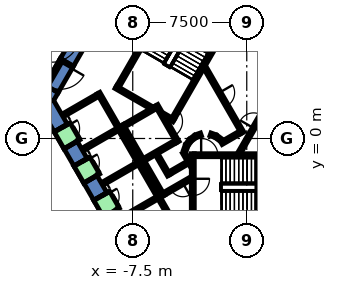
"""IFC4 building model, lengths in metres.
Left out: names, types, materials, properties, quantities, classifications, styles, units other than length and angle.
Written with IfcOpenShell. Run it as: python <this file> out.ifc"""

import sys

from ifc_helpers import new_model, si_unit, direction, frame, frame_2d, origin, place, context, subcontext, project, spatial, polyline, rectangle, outline, extrude, element, fill, save


model = new_model("IFC4")
c1 = context("Model", 3, precision=1e-05, world=origin(), true_north=direction((0.0, 1.0)))
c2 = subcontext(c1, "Body", "Model", "MODEL_VIEW")
j1 = project(units=[si_unit("LENGTHUNIT", "METRE"), si_unit("PLANEANGLEUNIT", "RADIAN")], contexts=[c1])
p1 = place(None, origin())
s1 = spatial("IfcSite", under=j1, at=p1, CompositionType="ELEMENT")
p2 = place(p1, origin())
s2 = spatial("IfcBuilding", under=s1, at=p2, CompositionType="ELEMENT")
p3 = place(p2, origin())
s3 = spatial("IfcBuildingStorey", under=s2, at=p3, CompositionType="ELEMENT", Elevation=0.0)
p4 = place(p3, frame((0.0, 0.0, -0.5)))
e1 = element("IfcWall", 1, at=p4, inside=s3, PredefinedType="SHEAR", context=c2, shape_type="SweptSolid", body=[
    extrude(outline(polyline([(-12.267, 5.252), (-11.402, 4.752), (-6.351, 13.5), (-6.928, 14.5), (-12.267, 5.252)])), origin(), (0.0, 0.0, 1.0), 9.05),
])
p5 = place(p3, frame((0.0, 0.0, -0.5)))
e2 = element("IfcWall", 2, at=p5, inside=s3, PredefinedType="SHEAR", context=c2, shape_type="SweptSolid", body=[
    extrude(outline(polyline([(-12.402, 3.02), (-13.267, 3.52), (-13.856, 2.5), (-12.702, 2.5), (-12.402, 3.02)])), origin(), (0.0, 0.0, 1.0), 9.05),
])
p6 = place(p3, frame((0.0, 0.0, 3.6)))
e3 = element("IfcWall", 3, at=p6, inside=s3, PredefinedType="SHEAR", context=c2, shape_type="SweptSolid", body=[
    extrude(outline(polyline([(-13.267, 3.52), (-12.402, 3.02), (-11.402, 4.752), (-12.267, 5.252), (-13.267, 3.52)])), origin(), (0.0, 0.0, 1.0), 4.95),
])
p7 = place(p3, frame((0.0, 0.0, -0.5)))
e4 = element("IfcWall", 4, at=p7, inside=s3, PredefinedType="SHEAR", context=c2, shape_type="SweptSolid", body=[
    extrude(outline(polyline([(-12.667, 0.44), (-11.801, 0.94), (-12.702, 2.5), (-13.856, 2.5), (-12.667, 0.44)])), origin(), (0.0, 0.0, 1.0), 9.05),
])
p8 = place(p3, frame((0.0, 0.0, -0.5)))
e5 = element("IfcWall", 5, at=p8, inside=s3, PredefinedType="SHEAR", context=c2, shape_type="SweptSolid", body=[
    extrude(outline(polyline([(-11.367, -1.811), (-10.501, -1.311), (-11.151, -0.186), (-12.017, -0.686), (-11.367, -1.811)])), origin(), (0.0, 0.0, 1.0), 9.05),
])
p9 = place(p3, frame((0.0, 0.0, -0.5)))
e6 = element("IfcWall", 6, at=p9, inside=s3, PredefinedType="SHEAR", context=c2, shape_type="SweptSolid", body=[
    extrude(outline(polyline([(-10.067, -4.063), (-9.201, -3.563), (-9.851, -2.437), (-10.717, -2.937), (-10.067, -4.063)])), origin(), (0.0, 0.0, 1.0), 9.05),
])
p10 = place(p3, frame((0.0, 0.0, -0.5)))
e7 = element("IfcWall", 7, at=p10, inside=s3, PredefinedType="SHEAR", context=c2, shape_type="SweptSolid", body=[
    extrude(outline(polyline([(-8.767, -6.314), (-7.902, -5.814), (-8.551, -4.689), (-9.417, -5.189), (-8.767, -6.314)])), origin(), (0.0, 0.0, 1.0), 9.05),
])
p11 = place(p3, frame((0.0, 0.0, 3.6)))
e8 = element("IfcWall", 8, at=p11, inside=s3, PredefinedType="SHEAR", context=c2, shape_type="SweptSolid", body=[
    extrude(outline(polyline([(-12.017, -0.686), (-11.151, -0.186), (-11.801, 0.94), (-12.667, 0.44), (-12.017, -0.686)])), origin(), (0.0, 0.0, 1.0), 4.95),
])
p12 = place(p3, frame((0.0, 0.0, 3.6)))
e9 = element("IfcWall", 9, at=p12, inside=s3, PredefinedType="SHEAR", context=c2, shape_type="SweptSolid", body=[
    extrude(outline(polyline([(-10.717, -2.937), (-9.851, -2.437), (-10.501, -1.311), (-11.367, -1.811), (-10.717, -2.937)])), origin(), (0.0, 0.0, 1.0), 4.95),
])
p13 = place(p3, frame((0.0, 0.0, 3.6)))
e10 = element("IfcWall", 10, at=p13, inside=s3, PredefinedType="SHEAR", context=c2, shape_type="SweptSolid", body=[
    extrude(outline(polyline([(-9.417, -5.189), (-8.551, -4.689), (-9.201, -3.563), (-10.067, -4.063), (-9.417, -5.189)])), origin(), (0.0, 0.0, 1.0), 4.95),
])
p14 = place(p3, frame((-3.9, -1.599, 0.0), z_axis=(0.0, 0.0, 1.0), x_axis=(-0.865969445389, -0.500096910261, 0.0)))
e11 = element("IfcWall", 11, at=p14, inside=s3, PredefinedType="PARTITIONING", context=c2, shape_type="SweptSolid", body=[
    extrude(rectangle(XDim=1.373, YDim=0.2, at=frame_2d((0.687, 0.0))), origin(), (0.0, 0.0, 1.0), 8.55),
])
p15 = place(p3, frame((-5.126, -2.422, 0.0), z_axis=(0.0, 0.0, 1.0), x_axis=(-0.500062241894, 0.865989465428, 0.0)))
e12 = element("IfcWall", 12, at=p15, inside=s3, PredefinedType="PARTITIONING", context=c2, shape_type="SweptSolid", body=[
    extrude(rectangle(XDim=1.7, YDim=0.2, at=frame_2d((0.85, 0.0))), origin(), (0.0, 0.0, 1.0), 8.55),
])
p16 = place(p3, frame((-5.492, -3.788, 0.0), z_axis=(0.0, 0.0, 1.0), x_axis=(-0.500008949224, 0.866020236886, 0.0)))
e13 = element("IfcWall", 13, at=p16, inside=s3, PredefinedType="PARTITIONING", context=c2, shape_type="SweptSolid", body=[
    extrude(rectangle(XDim=2.68, YDim=0.2, at=frame_2d((1.34, 0.0))), origin(), (0.0, 0.0, 1.0), 8.55),
])
p17 = place(p3, frame((-4.145, -0.92, 0.0), z_axis=(0.0, 0.0, 1.0), x_axis=(0.499743786207, -0.866173278362, 0.0)))
e14 = element("IfcWall", 14, at=p17, inside=s3, PredefinedType="PARTITIONING", context=c2, shape_type="SweptSolid", body=[
    extrude(rectangle(XDim=0.991, YDim=0.2, at=frame_2d((0.495, 0.0))), origin(), (0.0, 0.0, 1.0), 8.55),
])
p18 = place(p3, frame((-3.65, -2.61, 0.0), z_axis=(0.0, 0.0, 1.0), x_axis=(-0.866072462134, -0.499918483688, 0.0)))
e15 = element("IfcWall", 15, at=p18, inside=s3, PredefinedType="PARTITIONING", context=c2, shape_type="SweptSolid", body=[
    extrude(rectangle(XDim=2.084, YDim=0.2, at=frame_2d((1.042, 0.0))), origin(), (0.0, 0.0, 1.0), 8.55),
])
p19 = place(p18, frame((0.642, 0.0, 0.0)))
e16 = element("IfcOpeningElement", 16, at=p19, cuts=e15, PredefinedType="OPENING", context=c2, shape_type="SweptSolid", body=[
    extrude(rectangle(XDim=0.9, YDim=2.1, at=frame_2d((0.45, 1.05))), frame((0.0, 0.11, 0.0), z_axis=(0.0, -1.0, 0.0), x_axis=(1.0, 0.0, 0.0)), (0.0, 0.0, 1.0), 0.22),
])
p20 = place(p3, frame((-0.52, -1.0, 0.0), z_axis=(0.0, 0.0, 1.0), x_axis=(0.50011622646, 0.865958290007, 0.0)))
e17 = element("IfcWall", 17, at=p20, inside=s3, PredefinedType="PARTITIONING", context=c2, shape_type="SweptSolid", body=[
    extrude(rectangle(XDim=4.991, YDim=0.2, at=frame_2d((2.496, 0.0))), origin(), (0.0, 0.0, 1.0), 8.55),
])
p21 = place(p20, frame((1.945, 0.0, 0.0)))
e18 = element("IfcOpeningElement", 18, at=p21, cuts=e17, PredefinedType="OPENING", context=c2, shape_type="SweptSolid", body=[
    extrude(rectangle(XDim=1.0, YDim=2.1, at=frame_2d((0.5, 1.05))), frame((0.0, 0.11, 0.0), z_axis=(0.0, -1.0, 0.0), x_axis=(1.0, 0.0, 0.0)), (0.0, 0.0, 1.0), 0.22),
])
p22 = place(p3, frame((-0.412, 0.414, 0.0), z_axis=(0.0, 0.0, 1.0), x_axis=(-0.866017369001, -0.500013916395, 0.0)))
e19 = element("IfcWall", 19, at=p22, inside=s3, PredefinedType="PARTITIONING", context=c2, shape_type="SweptSolid", body=[
    extrude(rectangle(XDim=1.45, YDim=0.2, at=frame_2d((0.725, 0.0))), origin(), (0.0, 0.0, 1.0), 8.55),
])
p23 = place(p3, frame((-1.731, -0.077, 0.0), z_axis=(0.0, 0.0, 1.0), x_axis=(-0.804311165252, 0.594208338422, 0.0)))
e20 = element("IfcWall", 20, at=p23, inside=s3, PredefinedType="PARTITIONING", context=c2, shape_type="SweptSolid", body=[
    extrude(rectangle(XDim=0.338, YDim=0.2, at=frame_2d((0.169, 0.0))), origin(), (0.0, 0.0, 1.0), 8.55),
])
p24 = place(p3, frame((-2.07, 0.16, 0.0), z_axis=(0.0, 0.0, 1.0), x_axis=(-0.942199461132, 0.335052496547, 0.0)))
e21 = element("IfcWall", 21, at=p24, inside=s3, PredefinedType="PARTITIONING", context=c2, shape_type="SweptSolid", body=[
    extrude(rectangle(XDim=0.337, YDim=0.2, at=frame_2d((0.169, 0.0))), origin(), (0.0, 0.0, 1.0), 8.55),
])
p25 = place(p3, frame((-3.012, 0.273, 0.0), z_axis=(0.0, 0.0, 1.0), x_axis=(-0.942280615813, -0.334824194261, 0.0)))
e22 = element("IfcWall", 22, at=p25, inside=s3, PredefinedType="PARTITIONING", context=c2, shape_type="SweptSolid", body=[
    extrude(rectangle(XDim=0.338, YDim=0.2, at=frame_2d((0.169, 0.0))), origin(), (0.0, 0.0, 1.0), 8.55),
])
p26 = place(p3, frame((-3.397, 0.124, 0.0), z_axis=(0.0, 0.0, 1.0), x_axis=(-0.804311165252, -0.594208338422, 0.0)))
e23 = element("IfcWall", 23, at=p26, inside=s3, PredefinedType="PARTITIONING", context=c2, shape_type="SweptSolid", body=[
    extrude(rectangle(XDim=0.338, YDim=0.2, at=frame_2d((0.169, 0.0))), origin(), (0.0, 0.0, 1.0), 8.55),
])
p27 = place(p3, frame((-3.723, -0.131, 0.0), z_axis=(0.0, 0.0, 1.0), x_axis=(-0.594675113454, -0.803966112121, 0.0)))
e24 = element("IfcWall", 24, at=p27, inside=s3, PredefinedType="PARTITIONING", context=c2, shape_type="SweptSolid", body=[
    extrude(rectangle(XDim=0.338, YDim=0.2, at=frame_2d((0.169, 0.0))), origin(), (0.0, 0.0, 1.0), 8.55),
])
p28 = place(p3, frame((-3.96, -0.47, 0.0), z_axis=(0.0, 0.0, 1.0), x_axis=(-0.334824194261, -0.942280615813, 0.0)))
e25 = element("IfcWall", 25, at=p28, inside=s3, PredefinedType="PARTITIONING", context=c2, shape_type="SweptSolid", body=[
    extrude(rectangle(XDim=0.338, YDim=0.2, at=frame_2d((0.169, 0.0))), origin(), (0.0, 0.0, 1.0), 8.55),
])
p29 = place(p3, frame((-2.771, 4.7, 0.0), z_axis=(0.0, 0.0, 1.0), x_axis=(0.499969479948, -0.866043023828, 0.0)))
e26 = element("IfcWall", 26, at=p29, inside=s3, PredefinedType="PARTITIONING", context=c2, shape_type="SweptSolid", body=[
    extrude(rectangle(XDim=4.99, YDim=0.2, at=frame_2d((2.495, 0.0))), origin(), (0.0, 0.0, 1.0), 8.55),
])
p30 = place(p29, frame((1.945, 0.0, 0.0)))
e27 = element("IfcOpeningElement", 27, at=p30, cuts=e26, PredefinedType="OPENING", context=c2, shape_type="SweptSolid", body=[
    extrude(rectangle(XDim=1.0, YDim=2.1, at=frame_2d((0.5, 1.05))), frame((0.0, 0.11, 0.0), z_axis=(0.0, -1.0, 0.0), x_axis=(1.0, 0.0, 0.0)), (0.0, 0.0, 1.0), 0.22),
])
p31 = place(p3, frame((-18.107, 2.457, 0.0), z_axis=(0.0, 0.0, 1.0), x_axis=(0.499997929316, 0.866026599291, 0.0)))
e28 = element("IfcWall", 28, at=p31, inside=s3, PredefinedType="PARTITIONING", context=c2, shape_type="SweptSolid", body=[
    extrude(rectangle(XDim=18.182, YDim=0.1, at=frame_2d((9.091, 0.0))), origin(), (0.0, 0.0, 1.0), 8.55),
])
p32 = place(p31, frame((4.754, 0.0, 0.0)))
e29 = element("IfcOpeningElement", 29, at=p32, cuts=e28, PredefinedType="OPENING", context=c2, shape_type="SweptSolid", body=[
    extrude(rectangle(XDim=1.8, YDim=2.1, at=frame_2d((0.9, 1.05))), frame((0.0, 0.06, 0.0), z_axis=(0.0, -1.0, 0.0), x_axis=(1.0, 0.0, 0.0)), (0.0, 0.0, 1.0), 0.12),
])
p33 = place(p3, frame((-10.755, 10.354, 0.0), z_axis=(0.0, 0.0, 1.0), x_axis=(-0.49996876383, -0.866043437245, 0.0)))
e30 = element("IfcWall", 30, at=p33, inside=s3, PredefinedType="PARTITIONING", context=c2, shape_type="SweptSolid", body=[
    extrude(rectangle(XDim=7.179, YDim=0.15, at=frame_2d((3.589, 0.0))), origin(), (0.0, 0.0, 1.0), 8.55),
])
p34 = place(p33, frame((4.079, 0.0, 0.0)))
e31 = element("IfcOpeningElement", 31, at=p34, cuts=e30, PredefinedType="OPENING", context=c2, shape_type="SweptSolid", body=[
    extrude(rectangle(XDim=1.8, YDim=2.1, at=frame_2d((0.9, 1.05))), frame((0.0, 0.085, 0.0), z_axis=(0.0, -1.0, 0.0), x_axis=(1.0, 0.0, 0.0)), (0.0, 0.0, 1.0), 0.17),
])
p35 = place(p3, frame((-12.18, 5.202, 0.0), z_axis=(0.0, 0.0, 1.0), x_axis=(-0.50002537861, -0.866010750942, 0.0)))
e32 = element("IfcWall", 32, at=p35, inside=s3, PredefinedType="PARTITIONING", context=c2, shape_type="SweptSolid", body=[
    extrude(rectangle(XDim=2.0, YDim=0.2, at=frame_2d((1.0, 0.0))), origin(), (0.0, 0.0, 1.0), 2.4),
])
p36 = place(p35, frame((0.19, 0.0, 0.0)))
e33 = element("IfcOpeningElement", 33, at=p36, cuts=e32, PredefinedType="OPENING", context=c2, shape_type="SweptSolid", body=[
    extrude(rectangle(XDim=1.8, YDim=2.1, at=frame_2d((0.9, 1.05))), frame((0.0, 0.11, 0.0), z_axis=(0.0, -1.0, 0.0), x_axis=(1.0, 0.0, 0.0)), (0.0, 0.0, 1.0), 0.22),
])
p37 = place(p3, frame((-5.94, 2.188, 0.0), z_axis=(0.0, 0.0, 1.0), x_axis=(0.49994636267, -0.866056369097, 0.0)))
e34 = element("IfcWall", 34, at=p37, inside=s3, PredefinedType="STANDARD", context=c2, shape_type="SweptSolid", body=[
    extrude(rectangle(XDim=2.8, YDim=0.2, at=frame_2d((1.4, 0.0))), origin(), (0.0, 0.0, 1.0), 8.55),
])
p38 = place(p37, frame((1.225, 0.0, 0.0)))
e35 = element("IfcOpeningElement", 35, at=p38, cuts=e34, PredefinedType="OPENING", context=c2, shape_type="SweptSolid", body=[
    extrude(rectangle(XDim=1.1, YDim=2.1, at=frame_2d((0.55, 1.05))), frame((0.0, 0.11, 0.0), z_axis=(0.0, -1.0, 0.0), x_axis=(1.0, 0.0, 0.0)), (0.0, 0.0, 1.0), 0.22),
])
p39 = place(p3, frame((-8.192, 0.888, 0.0), z_axis=(0.0, 0.0, 1.0), x_axis=(0.49994636267, -0.866056369097, 0.0)))
e36 = element("IfcWall", 36, at=p39, inside=s3, PredefinedType="STANDARD", context=c2, shape_type="SweptSolid", body=[
    extrude(rectangle(XDim=2.8, YDim=0.2, at=frame_2d((1.4, 0.0))), origin(), (0.0, 0.0, 1.0), 8.55),
])
for number, where, z_axis, x_axis in (
    (37, (-5.977, 2.052, 0.0), (0.0, 0.0, 1.0), (-0.866, -0.5, 0.0)),
    (38, (-4.677, -0.2, 0.0), (0.0, 0.0, 1.0), (-0.866, -0.5, 0.0)),
):
    element("IfcWall", number, at=place(p3, frame(where, z_axis=z_axis, x_axis=x_axis)), inside=s3, PredefinedType="STANDARD", context=c2, shape_type="SweptSolid", body=[
        extrude(rectangle(XDim=2.399, YDim=0.2, at=frame_2d((1.2, 0.0))), origin(), (0.0, 0.0, 1.0), 8.55),
    ])
p40 = place(p3, frame((-9.751, 2.99, 0.0), z_axis=(0.0, 0.0, 1.0), x_axis=(0.50000090737, -0.866024879913, 0.0)))
e39 = element("IfcWall", 39, at=p40, inside=s3, PredefinedType="STANDARD", context=c2, shape_type="SweptSolid", body=[
    extrude(rectangle(XDim=10.6, YDim=0.2, at=frame_2d((5.3, 0.0))), origin(), (0.0, 0.0, 1.0), 8.55),
])
p41 = place(p3, frame((-9.788, 2.853, 0.0), z_axis=(0.0, 0.0, 1.0), x_axis=(-0.865998541277, -0.500046524342, 0.0)))
e40 = element("IfcWall", 40, at=p41, inside=s3, PredefinedType="STANDARD", context=c2, shape_type="SweptSolid", body=[
    extrude(rectangle(XDim=2.5, YDim=0.2, at=frame_2d((1.25, 0.0))), origin(), (0.0, 0.0, 1.0), 8.55),
])
for number, where, z_axis, x_axis in (
    (41, (-8.488, 0.602, 0.0), (0.0, 0.0, 1.0), (-0.866, -0.5, 0.0)),
    (42, (-7.188, -1.65, 0.0), (0.0, 0.0, 1.0), (-0.866, -0.5, 0.0)),
    (43, (-5.888, -3.902, 0.0), (0.0, 0.0, 1.0), (-0.866, -0.5, 0.0)),
):
    element("IfcWall", number, at=place(p3, frame(where, z_axis=z_axis, x_axis=x_axis)), inside=s3, PredefinedType="STANDARD", context=c2, shape_type="SweptSolid", body=[
        extrude(rectangle(XDim=2.5, YDim=0.2, at=frame_2d((1.25, 0.0))), origin(), (0.0, 0.0, 1.0), 8.55),
    ])
p42 = place(p3, frame((-12.148, 0.74, 0.0), z_axis=(0.0, 0.0, 1.0), x_axis=(0.500221244143, -0.865897630733, 0.0)))
e44 = element("IfcWall", 44, at=p42, inside=s3, PredefinedType="STANDARD", context=c2, shape_type="SweptSolid", body=[
    extrude(rectangle(XDim=1.299, YDim=1.2, at=frame_2d((0.65, 0.0))), origin(), (0.0, 0.0, 1.0), 2.4),
])
p43 = place(p42, frame((0.1, 0.0, 0.0)))
e45 = element("IfcOpeningElement", 45, at=p43, cuts=e44, PredefinedType="OPENING", context=c2, shape_type="SweptSolid", body=[
    extrude(rectangle(XDim=1.1, YDim=2.3, at=frame_2d((0.55, 1.15))), frame((0.0, 0.61, 0.0), z_axis=(0.0, -1.0, 0.0), x_axis=(1.0, 0.0, 0.0)), (0.0, 0.0, 1.0), 1.22),
])
p44 = place(p3, frame((-10.848, -1.511, 0.0), z_axis=(0.0, 0.0, 1.0), x_axis=(0.49989585183, -0.866085525409, 0.0)))
e46 = element("IfcWall", 46, at=p44, inside=s3, PredefinedType="STANDARD", context=c2, shape_type="SweptSolid", body=[
    extrude(rectangle(XDim=1.3, YDim=1.2, at=frame_2d((0.65, 0.0))), origin(), (0.0, 0.0, 1.0), 2.4),
])
p45 = place(p44, frame((0.1, 0.0, 0.0)))
e47 = element("IfcOpeningElement", 47, at=p45, cuts=e46, PredefinedType="OPENING", context=c2, shape_type="SweptSolid", body=[
    extrude(rectangle(XDim=1.1, YDim=2.3, at=frame_2d((0.55, 1.15))), frame((0.0, 0.61, 0.0), z_axis=(0.0, -1.0, 0.0), x_axis=(1.0, 0.0, 0.0)), (0.0, 0.0, 1.0), 1.22),
])
p46 = place(p3, frame((-9.548, -3.763, 0.0), z_axis=(0.0, 0.0, 1.0), x_axis=(0.500036693733, -0.866004217611, 0.0)))
e48 = element("IfcWall", 48, at=p46, inside=s3, PredefinedType="STANDARD", context=c2, shape_type="SweptSolid", body=[
    extrude(rectangle(XDim=1.3, YDim=1.2, at=frame_2d((0.65, 0.0))), origin(), (0.0, 0.0, 1.0), 2.4),
])
p47 = place(p46, frame((0.1, 0.0, 0.0)))
e49 = element("IfcOpeningElement", 49, at=p47, cuts=e48, PredefinedType="OPENING", context=c2, shape_type="SweptSolid", body=[
    extrude(rectangle(XDim=1.1, YDim=2.3, at=frame_2d((0.55, 1.15))), frame((0.0, 0.61, 0.0), z_axis=(0.0, -1.0, 0.0), x_axis=(1.0, 0.0, 0.0)), (0.0, 0.0, 1.0), 1.22),
])
p48 = place(p3, frame((-3.55, -1.0, 0.0), z_axis=(0.0, 0.0, 1.0), x_axis=(0.0, -1.0, 0.0)))
e50 = element("IfcWall", 50, at=p48, inside=s3, PredefinedType="STANDARD", context=c2, shape_type="SweptSolid", body=[
    extrude(rectangle(XDim=4.4, YDim=0.2, at=frame_2d((2.2, 0.0))), origin(), (0.0, 0.0, 1.0), 8.55),
])
p49 = place(p48, frame((1.65, 0.0, 0.0)))
e51 = element("IfcOpeningElement", 51, at=p49, cuts=e50, PredefinedType="OPENING", context=c2, shape_type="SweptSolid", body=[
    extrude(rectangle(XDim=1.1, YDim=2.2, at=frame_2d((0.55, 1.1))), frame((0.0, 0.11, 0.0), z_axis=(0.0, -1.0, 0.0), x_axis=(1.0, 0.0, 0.0)), (0.0, 0.0, 1.0), 0.22),
])
p50 = place(p3, frame((-3.45, -1.1, 0.0), z_axis=(0.0, 0.0, 1.0), x_axis=(1.0, 0.0, 0.0)))
e52 = element("IfcWall", 52, at=p50, inside=s3, PredefinedType="STANDARD", context=c2, shape_type="SweptSolid", body=[
    extrude(rectangle(XDim=6.9, YDim=0.2, at=frame_2d((3.45, 0.0))), origin(), (0.0, 0.0, 1.0), 8.55),
])
p51 = place(p50, frame((0.45, 0.0, 0.0)))
e53 = element("IfcOpeningElement", 53, at=p51, cuts=e52, PredefinedType="OPENING", context=c2, shape_type="SweptSolid", body=[
    extrude(rectangle(XDim=1.1, YDim=2.2, at=frame_2d((0.55, 1.1))), frame((0.0, 0.11, 0.0), z_axis=(0.0, -1.0, 0.0), x_axis=(1.0, 0.0, 0.0)), (0.0, 0.0, 1.0), 0.22),
])
p52 = place(p3, frame((-6.25, 2.01, 0.0), z_axis=(0.0, 0.0, 1.0), x_axis=(-0.86611865017, 0.499838457731, 0.0)))
e54 = element("IfcWall", 54, at=p52, inside=s3, PredefinedType="STANDARD", context=c2, shape_type="SweptSolid", body=[
    extrude(rectangle(XDim=2.733, YDim=0.2, at=frame_2d((1.366, 0.0))), origin(), (0.0, 0.0, 1.0), 8.55),
])
p53 = place(p3, frame((-4.806, 1.176, 0.0), z_axis=(0.0, 0.0, 1.0), x_axis=(-0.866558586415, 0.499075361355, 0.0)))
e55 = element("IfcWall", 55, at=p53, inside=s3, PredefinedType="STANDARD", context=c2, shape_type="SweptSolid", body=[
    extrude(rectangle(XDim=0.751, YDim=0.2, at=frame_2d((0.376, 0.0))), origin(), (0.0, 0.0, 1.0), 8.55),
])
p54 = place(p3, frame((-1.393, 7.288, 0.0), z_axis=(0.0, 0.0, 1.0), x_axis=(-0.499963383562, -0.866046543262, 0.0)))
e56 = element("IfcWall", 56, at=p54, inside=s3, PredefinedType="STANDARD", context=c2, shape_type="SweptSolid", body=[
    extrude(rectangle(XDim=6.9, YDim=0.2, at=frame_2d((3.45, 0.0))), origin(), (0.0, 0.0, 1.0), 8.55),
])
p55 = place(p54, frame((0.45, 0.0, 0.0)))
e57 = element("IfcOpeningElement", 57, at=p55, cuts=e56, PredefinedType="OPENING", context=c2, shape_type="SweptSolid", body=[
    extrude(rectangle(XDim=1.1, YDim=2.2, at=frame_2d((0.55, 1.1))), frame((0.0, 0.11, 0.0), z_axis=(0.0, -1.0, 0.0), x_axis=(1.0, 0.0, 0.0)), (0.0, 0.0, 1.0), 0.22),
])
p56 = place(p3, frame((-5.03, 9.388, 0.0), z_axis=(0.0, 0.0, 1.0), x_axis=(-0.499978703459, -0.866037698999, 0.0)))
e58 = element("IfcWall", 58, at=p56, inside=s3, PredefinedType="STANDARD", context=c2, shape_type="SweptSolid", body=[
    extrude(rectangle(XDim=6.9, YDim=0.2, at=frame_2d((3.45, 0.0))), origin(), (0.0, 0.0, 1.0), 8.55),
])
p57 = place(p34, origin())
e59 = element("IfcDoor", 59, at=p57, inside=s3, OperationType="DOUBLE_DOOR_SINGLE_SWING", PredefinedType="DOOR", context=c2, shape_type="SweptSolid", body=[
    extrude(rectangle(XDim=1.8, YDim=2.1, at=frame_2d((0.9, 1.05))), frame((0.0, 0.025, 0.0), z_axis=(0.0, -1.0, 0.0), x_axis=(1.0, 0.0, 0.0)), (0.0, 0.0, 1.0), 0.05),
])
fill(e31, e59)
p58 = place(p21, origin())
e60 = element("IfcDoor", 60, at=p58, inside=s3, OperationType="SINGLE_SWING_LEFT", PredefinedType="DOOR", context=c2, shape_type="SweptSolid", body=[
    extrude(rectangle(XDim=1.0, YDim=2.1, at=frame_2d((0.5, 1.05))), frame((0.0, 0.025, 0.0), z_axis=(0.0, -1.0, 0.0), x_axis=(1.0, 0.0, 0.0)), (0.0, 0.0, 1.0), 0.05),
])
fill(e18, e60)
p59 = place(p30, origin())
e61 = element("IfcDoor", 61, at=p59, inside=s3, OperationType="SINGLE_SWING_RIGHT", PredefinedType="DOOR", context=c2, shape_type="SweptSolid", body=[
    extrude(rectangle(XDim=1.0, YDim=2.1, at=frame_2d((0.5, 1.05))), frame((0.0, 0.025, 0.0), z_axis=(0.0, -1.0, 0.0), x_axis=(1.0, 0.0, 0.0)), (0.0, 0.0, 1.0), 0.05),
])
fill(e27, e61)
p60 = place(p19, origin())
e62 = element("IfcDoor", 62, at=p60, inside=s3, OperationType="SINGLE_SWING_LEFT", PredefinedType="DOOR", context=c2, shape_type="SweptSolid", body=[
    extrude(rectangle(XDim=0.9, YDim=2.1, at=frame_2d((0.45, 1.05))), frame((0.0, 0.025, 0.0), z_axis=(0.0, -1.0, 0.0), x_axis=(1.0, 0.0, 0.0)), (0.0, 0.0, 1.0), 0.05),
])
fill(e16, e62)
p61 = place(p36, origin())
e63 = element("IfcDoor", 63, at=p61, inside=s3, OperationType="DOUBLE_DOOR_SINGLE_SWING", PredefinedType="DOOR", context=c2, shape_type="SweptSolid", body=[
    extrude(rectangle(XDim=1.8, YDim=2.1, at=frame_2d((0.9, 1.05))), frame((0.0, 0.025, 0.0), z_axis=(0.0, -1.0, 0.0), x_axis=(1.0, 0.0, 0.0)), (0.0, 0.0, 1.0), 0.05),
])
fill(e33, e63)
p62 = place(p43, origin())
e64 = element("IfcDoor", 64, at=p62, inside=s3, OperationType="SLIDING_TO_LEFT", PredefinedType="DOOR", context=c2, shape_type="SweptSolid", body=[
    extrude(rectangle(XDim=1.1, YDim=2.3, at=frame_2d((0.55, 1.15))), frame((0.0, 0.025, 0.0), z_axis=(0.0, -1.0, 0.0), x_axis=(1.0, 0.0, 0.0)), (0.0, 0.0, 1.0), 0.05),
])
fill(e45, e64)
p63 = place(p45, origin())
e65 = element("IfcDoor", 65, at=p63, inside=s3, OperationType="SLIDING_TO_LEFT", PredefinedType="DOOR", context=c2, shape_type="SweptSolid", body=[
    extrude(rectangle(XDim=1.1, YDim=2.3, at=frame_2d((0.55, 1.15))), frame((0.0, 0.025, 0.0), z_axis=(0.0, -1.0, 0.0), x_axis=(1.0, 0.0, 0.0)), (0.0, 0.0, 1.0), 0.05),
])
fill(e47, e65)
p64 = place(p47, origin())
e66 = element("IfcDoor", 66, at=p64, inside=s3, OperationType="SLIDING_TO_LEFT", PredefinedType="DOOR", context=c2, shape_type="SweptSolid", body=[
    extrude(rectangle(XDim=1.1, YDim=2.3, at=frame_2d((0.55, 1.15))), frame((0.0, 0.025, 0.0), z_axis=(0.0, -1.0, 0.0), x_axis=(1.0, 0.0, 0.0)), (0.0, 0.0, 1.0), 0.05),
])
fill(e49, e66)
p65 = place(p38, origin())
e67 = element("IfcDoor", 67, at=p65, inside=s3, OperationType="SLIDING_TO_LEFT", PredefinedType="DOOR", context=c2, shape_type="SweptSolid", body=[
    extrude(rectangle(XDim=1.1, YDim=2.1, at=frame_2d((0.55, 1.05))), frame((0.0, 0.025, 0.0), z_axis=(0.0, -1.0, 0.0), x_axis=(1.0, 0.0, 0.0)), (0.0, 0.0, 1.0), 0.05),
])
fill(e35, e67)
p66 = place(p51, origin())
e68 = element("IfcDoor", 68, at=p66, inside=s3, OperationType="SINGLE_SWING_LEFT", PredefinedType="DOOR", context=c2, shape_type="SweptSolid", body=[
    extrude(rectangle(XDim=1.1, YDim=2.2, at=frame_2d((0.55, 1.1))), frame((0.0, 0.025, 0.0), z_axis=(0.0, -1.0, 0.0), x_axis=(1.0, 0.0, 0.0)), (0.0, 0.0, 1.0), 0.05),
])
fill(e53, e68)
p67 = place(p49, origin())
e69 = element("IfcDoor", 69, at=p67, inside=s3, OperationType="SINGLE_SWING_LEFT", PredefinedType="DOOR", context=c2, shape_type="SweptSolid", body=[
    extrude(rectangle(XDim=1.1, YDim=2.2, at=frame_2d((0.55, 1.1))), frame((0.0, 0.025, 0.0), z_axis=(0.0, -1.0, 0.0), x_axis=(1.0, 0.0, 0.0)), (0.0, 0.0, 1.0), 0.05),
])
fill(e51, e69)
save(model, sys.argv[1])
